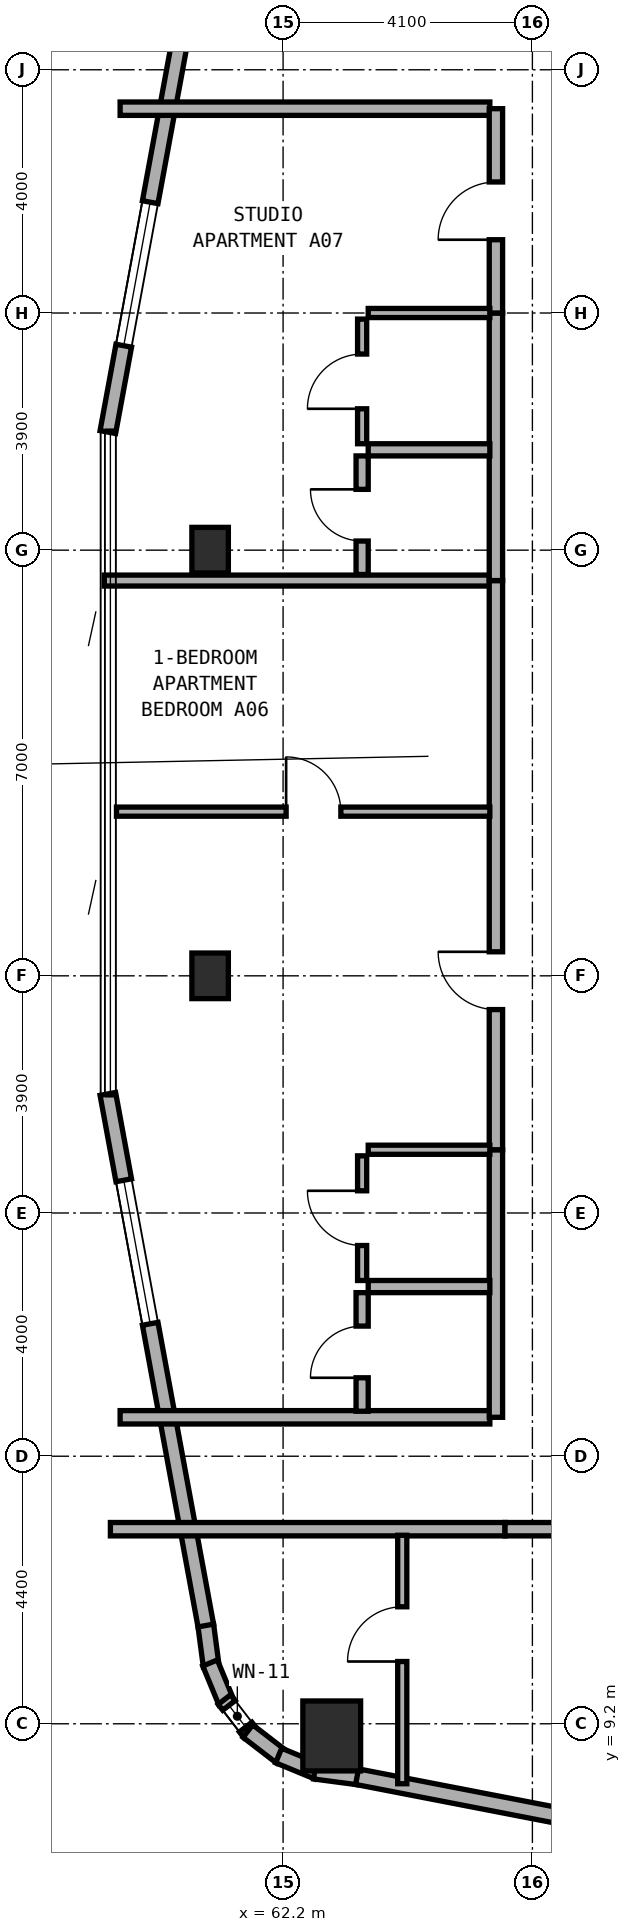
"""IFC4 building model, lengths in metres.
Left out: names, types, materials, properties, quantities, classifications, styles, units other than length and angle.
Written with IfcOpenShell. Run it as: python <this file> out.ifc"""

import sys

from ifc_helpers import new_model, si_unit, direction, frame, frame_2d, origin, origin_2d, place, context, subcontext, project, spatial, rectangle, extrude, element, fill, save


model = new_model("IFC4")
c1 = context("Model", 3, precision=1e-05, world=origin(), true_north=direction((0.0, 1.0)))
c2 = subcontext(c1, "Body", "Model", "MODEL_VIEW")
j1 = project(units=[si_unit("LENGTHUNIT", "METRE"), si_unit("PLANEANGLEUNIT", "RADIAN")], contexts=[c1])
p1 = place(None, origin())
s1 = spatial("IfcSite", under=j1, at=p1, CompositionType="ELEMENT")
p2 = place(p1, origin())
s2 = spatial("IfcBuilding", under=s1, at=p2, CompositionType="ELEMENT")
p3 = place(p2, frame((0.0, 0.0, 98.5)))
s3 = spatial("IfcBuildingStorey", under=s2, at=p3, CompositionType="ELEMENT", Elevation=98.5)
for number, where, z_axis, x_axis in (
    (1, (61.0, 21.5, 0.0), (0.0, 0.0, 1.0), (1.0, 0.0, 0.0)),
    (2, (61.0, 28.5, 0.0), (0.0, 0.0, 1.0), (1.0, 0.0, 0.0)),
):
    element("IfcColumn", number, at=place(p3, frame(where, z_axis=z_axis, x_axis=x_axis)), inside=s3, PredefinedType="COLUMN", context=c2, shape_type="SweptSolid", body=[
        extrude(rectangle(XDim=0.6, YDim=0.75, at=origin_2d()), origin(), (0.0, 0.0, 1.0), 3.5),
    ])
p4 = place(p3, frame((63.0, 9.0, 0.0), z_axis=(0.0, 0.0, 1.0), x_axis=(1.0, 0.0, 0.0)))
e3 = element("IfcColumn", 3, at=p4, inside=s3, PredefinedType="COLUMN", context=c2, shape_type="SweptSolid", body=[
    extrude(rectangle(XDim=0.95, YDim=1.15, at=origin_2d()), origin(), (0.0, 0.0, 1.0), 3.5),
])
p5 = place(p3, frame((60.928, 10.825, 0.0), z_axis=(0.0, 0.0, 1.0), x_axis=(0.131667498923, -0.991293937098, 0.0)))
e4 = element("IfcWall", 4, at=p5, inside=s3, PredefinedType="STANDARD", context=c2, shape_type="SweptSolid", body=[
    extrude(rectangle(XDim=0.677, YDim=0.26, at=frame_2d((0.338, 0.0))), origin(), (0.0, 0.0, 1.0), 3.25),
])
p6 = place(p3, frame((60.999, 10.2, 0.0), z_axis=(0.0, 0.0, 1.0), x_axis=(0.381988976935, -0.924166879681, 0.0)))
e5 = element("IfcWall", 5, at=p6, inside=s3, PredefinedType="STANDARD", context=c2, shape_type="SweptSolid", body=[
    extrude(rectangle(XDim=0.693, YDim=0.26, at=frame_2d((0.347, 0.0))), origin(), (0.0, 0.0, 1.0), 3.25),
])
p7 = place(p3, frame((61.236, 9.599, 0.0), z_axis=(0.0, 0.0, 1.0), x_axis=(0.609472651958, -0.792807092876, 0.0)))
e6 = element("IfcWall", 6, at=p7, inside=s3, PredefinedType="STANDARD", context=c2, shape_type="SweptSolid", body=[
    extrude(rectangle(XDim=0.694, YDim=0.26, at=frame_2d((0.347, 0.0))), origin(), (0.0, 0.0, 1.0), 3.25),
])
p8 = place(p7, frame((0.122, 0.0, 0.85)))
e7 = element("IfcOpeningElement", 7, at=p8, cuts=e6, PredefinedType="OPENING", context=c2, shape_type="SweptSolid", body=[
    extrude(rectangle(XDim=0.45, YDim=1.5, at=frame_2d((0.225, 0.75))), frame((0.0, 0.14, 0.0), z_axis=(0.0, -1.0, 0.0), x_axis=(1.0, 0.0, 0.0)), (0.0, 0.0, 1.0), 0.28),
])
p9 = place(p3, frame((61.621, 9.08, 0.0), z_axis=(0.0, 0.0, 1.0), x_axis=(0.792506234191, -0.609863811657, 0.0)))
e8 = element("IfcWall", 8, at=p9, inside=s3, PredefinedType="STANDARD", context=c2, shape_type="SweptSolid", body=[
    extrude(rectangle(XDim=0.694, YDim=0.26, at=frame_2d((0.347, 0.0))), origin(), (0.0, 0.0, 1.0), 3.25),
])
p10 = place(p3, frame((62.127, 8.678, 0.0), z_axis=(0.0, 0.0, 1.0), x_axis=(0.92421822618, -0.381864727877, 0.0)))
e9 = element("IfcWall", 9, at=p10, inside=s3, PredefinedType="STANDARD", context=c2, shape_type="SweptSolid", body=[
    extrude(rectangle(XDim=0.694, YDim=0.26, at=frame_2d((0.347, 0.0))), origin(), (0.0, 0.0, 1.0), 3.25),
])
p11 = place(p3, frame((62.719, 8.421, 0.0), z_axis=(0.0, 0.0, 1.0), x_axis=(0.991433279471, -0.130614135366, 0.0)))
e10 = element("IfcWall", 10, at=p11, inside=s3, PredefinedType="STANDARD", context=c2, shape_type="SweptSolid", body=[
    extrude(rectangle(XDim=0.712, YDim=0.26, at=frame_2d((0.356, 0.0))), origin(), (0.0, 0.0, 1.0), 3.25),
])
p12 = place(p3, frame((63.417, 8.33, 0.0), z_axis=(0.0, 0.0, 1.0), x_axis=(0.981750199588, -0.190175039396, 0.0)))
e11 = element("IfcWall", 11, at=p12, inside=s3, PredefinedType="STANDARD", context=c2, shape_type="SweptSolid", body=[
    extrude(rectangle(XDim=8.477, YDim=0.26, at=frame_2d((4.238, 0.0))), origin(), (0.0, 0.0, 1.0), 3.25),
])
p13 = place(p12, frame((3.454, 0.0, 0.8)))
e12 = element("IfcOpeningElement", 12, at=p13, cuts=e11, PredefinedType="OPENING", context=c2, shape_type="SweptSolid", body=[
    extrude(rectangle(XDim=2.4, YDim=1.6, at=frame_2d((1.2, 0.8))), frame((0.0, 0.14, 0.0), z_axis=(0.0, -1.0, 0.0), x_axis=(1.0, 0.0, 0.0)), (0.0, 0.0, 1.0), 0.28),
])
p14 = place(p3, frame((60.929, 39.184, 0.0), z_axis=(0.0, 0.0, 1.0), x_axis=(-0.181209963057, -0.983444431215, 0.0)))
e13 = element("IfcWall", 13, at=p14, inside=s3, PredefinedType="STANDARD", context=c2, shape_type="SweptSolid", body=[
    extrude(rectangle(XDim=8.889, YDim=0.26, at=frame_2d((4.445, 0.0))), origin(), (0.0, 0.0, 1.0), 3.25),
])
p15 = place(p14, frame((5.045, 0.0, 0.8)))
e14 = element("IfcOpeningElement", 14, at=p15, cuts=e13, PredefinedType="OPENING", context=c2, shape_type="SweptSolid", body=[
    extrude(rectangle(XDim=2.4, YDim=1.6, at=frame_2d((1.2, 0.8))), frame((0.0, 0.14, 0.0), z_axis=(0.0, -1.0, 0.0), x_axis=(1.0, 0.0, 0.0)), (0.0, 0.0, 1.0), 0.28),
])
p16 = place(p3, frame((59.318, 19.558, 0.0), z_axis=(0.0, 0.0, 1.0), x_axis=(0.181209963057, -0.983444431215, 0.0)))
e15 = element("IfcWall", 15, at=p16, inside=s3, PredefinedType="STANDARD", context=c2, shape_type="SweptSolid", body=[
    extrude(rectangle(XDim=8.889, YDim=0.26, at=frame_2d((4.445, 0.0))), origin(), (0.0, 0.0, 1.0), 3.25),
])
p17 = place(p16, frame((1.444, 0.0, 0.8)))
e16 = element("IfcOpeningElement", 16, at=p17, cuts=e15, PredefinedType="OPENING", context=c2, shape_type="SweptSolid", body=[
    extrude(rectangle(XDim=2.4, YDim=1.6, at=frame_2d((1.2, 0.8))), frame((0.0, 0.14, 0.0), z_axis=(0.0, -1.0, 0.0), x_axis=(1.0, 0.0, 0.0)), (0.0, 0.0, 1.0), 0.28),
])
p18 = place(p3, frame((59.36, 12.4, 0.0), z_axis=(0.0, 0.0, 1.0), x_axis=(1.0, 0.0, 0.0)))
e17 = element("IfcWall", 17, at=p18, inside=s3, PredefinedType="SOLIDWALL", context=c2, shape_type="SweptSolid", body=[
    extrude(rectangle(XDim=6.49, YDim=0.22, at=frame_2d((3.245, 0.0))), origin(), (0.0, 0.0, 1.0), 2.945),
])
p19 = place(p3, frame((65.85, 12.4, 0.0), z_axis=(0.0, 0.0, 1.0), x_axis=(1.0, 0.0, 0.0)))
e18 = element("IfcWall", 18, at=p19, inside=s3, PredefinedType="SOLIDWALL", context=c2, shape_type="SweptSolid", body=[
    extrude(rectangle(XDim=4.57, YDim=0.22, at=frame_2d((2.285, 0.0))), origin(), (0.0, 0.0, 1.0), 3.22),
])
p20 = place(p19, frame((1.81, 0.0, 0.0)))
e19 = element("IfcOpeningElement", 19, at=p20, cuts=e18, PredefinedType="OPENING", context=c2, shape_type="SweptSolid", body=[
    extrude(rectangle(XDim=0.95, YDim=2.1, at=frame_2d((0.475, 1.05))), frame((0.0, 0.12, 0.0), z_axis=(0.0, -1.0, 0.0), x_axis=(1.0, 0.0, 0.0)), (0.0, 0.0, 1.0), 0.24),
])
p21 = place(p3, frame((64.16, 8.214, 0.0), z_axis=(0.0, 0.0, 1.0), x_axis=(0.0, 1.0, 0.0)))
e20 = element("IfcWall", 20, at=p21, inside=s3, PredefinedType="PARTITIONING", context=c2, shape_type="SweptSolid", body=[
    extrude(rectangle(XDim=4.086, YDim=0.15, at=frame_2d((2.043, 0.0))), origin(), (0.0, 0.0, 1.0), 2.945),
])
p22 = place(p21, frame((2.01, 0.0, 0.0)))
e21 = element("IfcOpeningElement", 21, at=p22, cuts=e20, PredefinedType="OPENING", context=c2, shape_type="SweptSolid", body=[
    extrude(rectangle(XDim=0.9, YDim=2.1, at=frame_2d((0.45, 1.05))), frame((0.0, 0.085, 0.0), z_axis=(0.0, -1.0, 0.0), x_axis=(1.0, 0.0, 0.0)), (0.0, 0.0, 1.0), 0.17),
])
for number, where, z_axis, x_axis in (
    (22, (59.52, 14.24, 0.0), (0.0, 0.0, 1.0), (1.0, 0.0, 0.0)),
    (23, (59.52, 35.76, 0.0), (0.0, 0.0, 1.0), (1.0, 0.0, 0.0)),
):
    element("IfcWall", number, at=place(p3, frame(where, z_axis=z_axis, x_axis=x_axis)), inside=s3, PredefinedType="SOLIDWALL", context=c2, shape_type="SweptSolid", body=[
        extrude(rectangle(XDim=6.08, YDim=0.22, at=frame_2d((3.04, 0.0))), origin(), (0.0, 0.0, 1.0), 2.945),
    ])
p23 = place(p3, frame((59.26, 28.0, 0.0), z_axis=(0.0, 0.0, 1.0), x_axis=(1.0, 0.0, 0.0)))
e24 = element("IfcWall", 24, at=p23, inside=s3, PredefinedType="SOLIDWALL", context=c2, shape_type="SweptSolid", body=[
    extrude(rectangle(XDim=6.44, YDim=0.18, at=frame_2d((3.22, 0.0))), origin(), (0.0, 0.0, 1.0), 2.945),
])
p24 = place(p3, frame((65.7, 14.24, 0.0), z_axis=(0.0, 0.0, 1.0), x_axis=(0.0, 1.0, 0.0)))
e25 = element("IfcWall", 25, at=p24, inside=s3, PredefinedType="SOLIDWALL", context=c2, shape_type="SweptSolid", body=[
    extrude(rectangle(XDim=4.4, YDim=0.22, at=frame_2d((2.2, 0.0))), origin(), (0.0, 0.0, 1.0), 3.22),
])
p25 = place(p3, frame((65.7, 18.64, 0.0), z_axis=(0.0, 0.0, 1.0), x_axis=(0.0, 1.0, 0.0)))
e26 = element("IfcWall", 26, at=p25, inside=s3, PredefinedType="SOLIDWALL", context=c2, shape_type="SweptSolid", body=[
    extrude(rectangle(XDim=9.36, YDim=0.22, at=frame_2d((4.68, 0.0))), origin(), (0.0, 0.0, 1.0), 2.825),
])
p26 = place(p25, frame((2.305, 0.0, 0.0)))
e27 = element("IfcOpeningElement", 27, at=p26, cuts=e26, PredefinedType="OPENING", context=c2, shape_type="SweptSolid", body=[
    extrude(rectangle(XDim=0.95, YDim=2.1, at=frame_2d((0.475, 1.05))), frame((0.0, 0.12, 0.0), z_axis=(0.0, -1.0, 0.0), x_axis=(1.0, 0.0, 0.0)), (0.0, 0.0, 1.0), 0.24),
])
p27 = place(p3, frame((59.46, 24.2, 0.0), z_axis=(0.0, 0.0, 1.0), x_axis=(1.0, 0.0, 0.0)))
e28 = element("IfcWall", 28, at=p27, inside=s3, PredefinedType="PARTITIONING", context=c2, shape_type="SweptSolid", body=[
    extrude(rectangle(XDim=6.14, YDim=0.15, at=frame_2d((3.07, 0.0))), origin(), (0.0, 0.0, 1.0), 2.945),
])
p28 = place(p27, frame((2.79, 0.0, 0.0)))
e29 = element("IfcOpeningElement", 29, at=p28, cuts=e28, PredefinedType="OPENING", context=c2, shape_type="SweptSolid", body=[
    extrude(rectangle(XDim=0.9, YDim=2.1, at=frame_2d((0.45, 1.05))), frame((0.0, 0.085, 0.0), z_axis=(0.0, -1.0, 0.0), x_axis=(1.0, 0.0, 0.0)), (0.0, 0.0, 1.0), 0.17),
])
p29 = place(p3, frame((63.6, 16.39, 0.0), z_axis=(0.0, 0.0, 1.0), x_axis=(1.0, 0.0, 0.0)))
e30 = element("IfcWall", 30, at=p29, inside=s3, PredefinedType="PLUMBINGWALL", context=c2, shape_type="SweptSolid", body=[
    extrude(rectangle(XDim=2.0, YDim=0.2, at=frame_2d((1.0, 0.0))), origin(), (0.0, 0.0, 1.0), 3.22),
])
p30 = place(p3, frame((63.6, 18.64, 0.0), z_axis=(0.0, 0.0, 1.0), x_axis=(1.0, 0.0, 0.0)))
e31 = element("IfcWall", 31, at=p30, inside=s3, PredefinedType="PARTITIONING", context=c2, shape_type="SweptSolid", body=[
    extrude(rectangle(XDim=2.0, YDim=0.15, at=frame_2d((1.0, 0.0))), origin(), (0.0, 0.0, 1.0), 3.22),
])
p31 = place(p3, frame((63.5, 14.34, 0.0), z_axis=(0.0, 0.0, 1.0), x_axis=(0.0, 1.0, 0.0)))
e32 = element("IfcWall", 32, at=p31, inside=s3, PredefinedType="PLUMBINGWALL", context=c2, shape_type="SweptSolid", body=[
    extrude(rectangle(XDim=1.95, YDim=0.2, at=frame_2d((0.975, 0.0))), origin(), (0.0, 0.0, 1.0), 3.22),
])
p32 = place(p31, frame((0.55, 0.0, 0.0)))
e33 = element("IfcOpeningElement", 33, at=p32, cuts=e32, PredefinedType="OPENING", context=c2, shape_type="SweptSolid", body=[
    extrude(rectangle(XDim=0.85, YDim=2.1, at=frame_2d((0.425, 1.05))), frame((0.0, 0.11, 0.0), z_axis=(0.0, -1.0, 0.0), x_axis=(1.0, 0.0, 0.0)), (0.0, 0.0, 1.0), 0.22),
])
p33 = place(p3, frame((63.5, 16.49, 0.0), z_axis=(0.0, 0.0, 1.0), x_axis=(0.0, 1.0, 0.0)))
e34 = element("IfcWall", 34, at=p33, inside=s3, PredefinedType="PARTITIONING", context=c2, shape_type="SweptSolid", body=[
    extrude(rectangle(XDim=2.05, YDim=0.15, at=frame_2d((1.025, 0.0))), origin(), (0.0, 0.0, 1.0), 3.22),
])
p34 = place(p33, frame((0.575, 0.0, 0.0)))
e35 = element("IfcOpeningElement", 35, at=p34, cuts=e34, PredefinedType="OPENING", context=c2, shape_type="SweptSolid", body=[
    extrude(rectangle(XDim=0.9, YDim=2.1, at=frame_2d((0.45, 1.05))), frame((0.0, 0.085, 0.0), z_axis=(0.0, -1.0, 0.0), x_axis=(1.0, 0.0, 0.0)), (0.0, 0.0, 1.0), 0.17),
])
p35 = place(p3, frame((65.7, 28.0, 0.0), z_axis=(0.0, 0.0, 1.0), x_axis=(0.0, 1.0, 0.0)))
e36 = element("IfcWall", 36, at=p35, inside=s3, PredefinedType="SOLIDWALL", context=c2, shape_type="SweptSolid", body=[
    extrude(rectangle(XDim=4.4, YDim=0.22, at=frame_2d((2.2, 0.0))), origin(), (0.0, 0.0, 1.0), 2.825),
])
p36 = place(p3, frame((65.7, 32.4, 0.0), z_axis=(0.0, 0.0, 1.0), x_axis=(0.0, 1.0, 0.0)))
e37 = element("IfcWall", 37, at=p36, inside=s3, PredefinedType="SOLIDWALL", context=c2, shape_type="SweptSolid", body=[
    extrude(rectangle(XDim=3.36, YDim=0.22, at=frame_2d((1.68, 0.0))), origin(), (0.0, 0.0, 1.0), 3.22),
])
p37 = place(p36, frame((1.205, 0.0, 0.0)))
e38 = element("IfcOpeningElement", 38, at=p37, cuts=e37, PredefinedType="OPENING", context=c2, shape_type="SweptSolid", body=[
    extrude(rectangle(XDim=0.95, YDim=2.1, at=frame_2d((0.475, 1.05))), frame((0.0, 0.12, 0.0), z_axis=(0.0, -1.0, 0.0), x_axis=(1.0, 0.0, 0.0)), (0.0, 0.0, 1.0), 0.24),
])
p38 = place(p3, frame((63.6, 30.15, 0.0), z_axis=(0.0, 0.0, 1.0), x_axis=(1.0, 0.0, 0.0)))
e39 = element("IfcWall", 39, at=p38, inside=s3, PredefinedType="PLUMBINGWALL", context=c2, shape_type="SweptSolid", body=[
    extrude(rectangle(XDim=2.0, YDim=0.2, at=frame_2d((1.0, 0.0))), origin(), (0.0, 0.0, 1.0), 3.22),
])
p39 = place(p3, frame((63.6, 32.4, 0.0), z_axis=(0.0, 0.0, 1.0), x_axis=(1.0, 0.0, 0.0)))
e40 = element("IfcWall", 40, at=p39, inside=s3, PredefinedType="PARTITIONING", context=c2, shape_type="SweptSolid", body=[
    extrude(rectangle(XDim=2.0, YDim=0.15, at=frame_2d((1.0, 0.0))), origin(), (0.0, 0.0, 1.0), 3.22),
])
p40 = place(p3, frame((63.5, 28.1, 0.0), z_axis=(0.0, 0.0, 1.0), x_axis=(0.0, 1.0, 0.0)))
e41 = element("IfcWall", 41, at=p40, inside=s3, PredefinedType="PLUMBINGWALL", context=c2, shape_type="SweptSolid", body=[
    extrude(rectangle(XDim=1.95, YDim=0.2, at=frame_2d((0.975, 0.0))), origin(), (0.0, 0.0, 1.0), 2.825),
])
p41 = place(p40, frame((0.55, 0.0, 0.0)))
e42 = element("IfcOpeningElement", 42, at=p41, cuts=e41, PredefinedType="OPENING", context=c2, shape_type="SweptSolid", body=[
    extrude(rectangle(XDim=0.85, YDim=2.1, at=frame_2d((0.425, 1.05))), frame((0.0, 0.11, 0.0), z_axis=(0.0, -1.0, 0.0), x_axis=(1.0, 0.0, 0.0)), (0.0, 0.0, 1.0), 0.22),
])
p42 = place(p3, frame((63.5, 30.25, 0.0), z_axis=(0.0, 0.0, 1.0), x_axis=(0.0, 1.0, 0.0)))
e43 = element("IfcWall", 43, at=p42, inside=s3, PredefinedType="PARTITIONING", context=c2, shape_type="SweptSolid", body=[
    extrude(rectangle(XDim=2.05, YDim=0.15, at=frame_2d((1.025, 0.0))), origin(), (0.0, 0.0, 1.0), 3.22),
])
p43 = place(p42, frame((0.575, 0.0, 0.0)))
e44 = element("IfcOpeningElement", 44, at=p43, cuts=e43, PredefinedType="OPENING", context=c2, shape_type="SweptSolid", body=[
    extrude(rectangle(XDim=0.9, YDim=2.1, at=frame_2d((0.45, 1.05))), frame((0.0, 0.085, 0.0), z_axis=(0.0, -1.0, 0.0), x_axis=(1.0, 0.0, 0.0)), (0.0, 0.0, 1.0), 0.17),
])
p44 = place(p15, origin())
e45 = element("IfcWindow", 45, at=p44, inside=s3, PartitioningType="SINGLE_PANEL", PredefinedType="WINDOW", context=c2, shape_type="SweptSolid", body=[
    extrude(rectangle(XDim=2.4, YDim=1.6, at=frame_2d((1.2, 0.8))), frame((0.0, 0.03, 0.0), z_axis=(0.0, -1.0, 0.0), x_axis=(1.0, 0.0, 0.0)), (0.0, 0.0, 1.0), 0.06),
])
fill(e14, e45)
p45 = place(p17, origin())
e46 = element("IfcWindow", 46, at=p45, inside=s3, PartitioningType="SINGLE_PANEL", PredefinedType="WINDOW", context=c2, shape_type="SweptSolid", body=[
    extrude(rectangle(XDim=2.4, YDim=1.6, at=frame_2d((1.2, 0.8))), frame((0.0, 0.03, 0.0), z_axis=(0.0, -1.0, 0.0), x_axis=(1.0, 0.0, 0.0)), (0.0, 0.0, 1.0), 0.06),
])
fill(e16, e46)
p46 = place(p8, origin())
e47 = element("IfcWindow", 47, at=p46, inside=s3, PartitioningType="SINGLE_PANEL", PredefinedType="WINDOW", context=c2, shape_type="SweptSolid", body=[
    extrude(rectangle(XDim=0.45, YDim=1.5, at=frame_2d((0.225, 0.75))), frame((0.0, 0.03, 0.0), z_axis=(0.0, -1.0, 0.0), x_axis=(1.0, 0.0, 0.0)), (0.0, 0.0, 1.0), 0.06),
])
fill(e7, e47)
p47 = place(p22, origin())
e48 = element("IfcDoor", 48, at=p47, inside=s3, OperationType="SINGLE_SWING_LEFT", PredefinedType="DOOR", context=c2, shape_type="SweptSolid", body=[
    extrude(rectangle(XDim=0.9, YDim=2.1, at=frame_2d((0.45, 1.05))), frame((0.0, 0.025, 0.0), z_axis=(0.0, -1.0, 0.0), x_axis=(1.0, 0.0, 0.0)), (0.0, 0.0, 1.0), 0.05),
])
fill(e21, e48)
p48 = place(p26, origin())
e49 = element("IfcDoor", 49, at=p48, inside=s3, OperationType="SINGLE_SWING_RIGHT", PredefinedType="DOOR", context=c2, shape_type="SweptSolid", body=[
    extrude(rectangle(XDim=0.95, YDim=2.1, at=frame_2d((0.475, 1.05))), frame((0.0, 0.025, 0.0), z_axis=(0.0, -1.0, 0.0), x_axis=(1.0, 0.0, 0.0)), (0.0, 0.0, 1.0), 0.05),
])
fill(e27, e49)
p49 = place(p28, origin())
e50 = element("IfcDoor", 50, at=p49, inside=s3, OperationType="SINGLE_SWING_LEFT", PredefinedType="DOOR", context=c2, shape_type="SweptSolid", body=[
    extrude(rectangle(XDim=0.9, YDim=2.1, at=frame_2d((0.45, 1.05))), frame((0.0, 0.025, 0.0), z_axis=(0.0, -1.0, 0.0), x_axis=(1.0, 0.0, 0.0)), (0.0, 0.0, 1.0), 0.05),
])
fill(e29, e50)
p50 = place(p32, origin())
e51 = element("IfcDoor", 51, at=p50, inside=s3, OperationType="SINGLE_SWING_LEFT", PredefinedType="DOOR", context=c2, shape_type="SweptSolid", body=[
    extrude(rectangle(XDim=0.85, YDim=2.1, at=frame_2d((0.425, 1.05))), frame((0.0, 0.025, 0.0), z_axis=(0.0, -1.0, 0.0), x_axis=(1.0, 0.0, 0.0)), (0.0, 0.0, 1.0), 0.05),
])
fill(e33, e51)
p51 = place(p34, origin())
e52 = element("IfcDoor", 52, at=p51, inside=s3, OperationType="SINGLE_SWING_RIGHT", PredefinedType="DOOR", context=c2, shape_type="SweptSolid", body=[
    extrude(rectangle(XDim=0.9, YDim=2.1, at=frame_2d((0.45, 1.05))), frame((0.0, 0.025, 0.0), z_axis=(0.0, -1.0, 0.0), x_axis=(1.0, 0.0, 0.0)), (0.0, 0.0, 1.0), 0.05),
])
fill(e35, e52)
p52 = place(p37, origin())
e53 = element("IfcDoor", 53, at=p52, inside=s3, OperationType="SINGLE_SWING_LEFT", PredefinedType="DOOR", context=c2, shape_type="SweptSolid", body=[
    extrude(rectangle(XDim=0.95, YDim=2.1, at=frame_2d((0.475, 1.05))), frame((0.0, 0.025, 0.0), z_axis=(0.0, -1.0, 0.0), x_axis=(1.0, 0.0, 0.0)), (0.0, 0.0, 1.0), 0.05),
])
fill(e38, e53)
p53 = place(p41, origin())
e54 = element("IfcDoor", 54, at=p53, inside=s3, OperationType="SINGLE_SWING_RIGHT", PredefinedType="DOOR", context=c2, shape_type="SweptSolid", body=[
    extrude(rectangle(XDim=0.85, YDim=2.1, at=frame_2d((0.425, 1.05))), frame((0.0, 0.025, 0.0), z_axis=(0.0, -1.0, 0.0), x_axis=(1.0, 0.0, 0.0)), (0.0, 0.0, 1.0), 0.05),
])
fill(e42, e54)
p54 = place(p43, origin())
e55 = element("IfcDoor", 55, at=p54, inside=s3, OperationType="SINGLE_SWING_LEFT", PredefinedType="DOOR", context=c2, shape_type="SweptSolid", body=[
    extrude(rectangle(XDim=0.9, YDim=2.1, at=frame_2d((0.45, 1.05))), frame((0.0, 0.025, 0.0), z_axis=(0.0, -1.0, 0.0), x_axis=(1.0, 0.0, 0.0)), (0.0, 0.0, 1.0), 0.05),
])
fill(e44, e55)
save(model, sys.argv[1])
